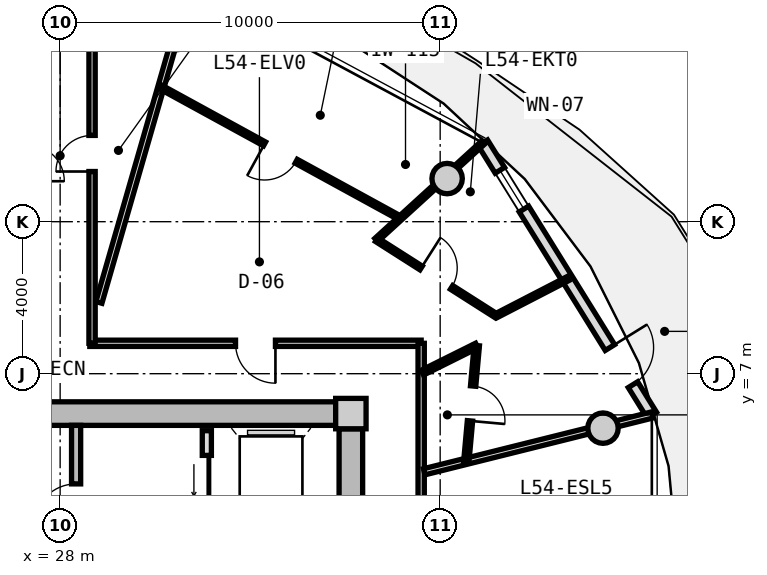
"""IFC4 building model, lengths in metres.
Left out: names, types, materials, properties, quantities, classifications, styles, units other than length and angle.
Written with IfcOpenShell. Run it as: python <this file> out.ifc"""

import sys

from ifc_helpers import new_model, si_unit, direction, frame, frame_2d, origin, origin_2d, place, context, subcontext, project, spatial, rectangle, circle, extrude, source, transform, mapped, element, fill, save


model = new_model("IFC4")
c1 = context("Model", 3, precision=1e-05, world=origin(), true_north=direction((0.0, 1.0)))
c2 = subcontext(c1, "Body", "Model", "MODEL_VIEW")
j1 = project(units=[si_unit("LENGTHUNIT", "METRE"), si_unit("PLANEANGLEUNIT", "RADIAN")], contexts=[c1])
p1 = place(None, origin())
s1 = spatial("IfcSite", under=j1, at=p1, CompositionType="ELEMENT")
p2 = place(p1, origin())
s2 = spatial("IfcBuilding", under=s1, at=p2, CompositionType="ELEMENT")
p3 = place(p2, frame((0.0, 0.0, 173.95)))
s3 = spatial("IfcBuildingStorey", under=s2, at=p3, CompositionType="ELEMENT", Elevation=173.95)
m1 = source(origin(), c2, "Body", "SweptSolid", [
    extrude(rectangle(XDim=0.8, YDim=0.8, at=origin_2d()), origin(), (0.0, 0.0, 1.0), 3.05),
])
p4 = place(p3, frame((35.65, 5.95, 0.0), z_axis=(0.0, 0.0, 1.0), x_axis=(1.0, 0.0, 0.0)))
e1 = element("IfcColumn", 1, at=p4, inside=s3, PredefinedType="COLUMN", context=c2, shape_type="MappedRepresentation", body=[
    mapped(m1, transform((0.0, 0.0, 0.0), x_axis=(1.0, 0.0, 0.0), y_axis=(0.0, 1.0, 0.0), z_axis=(0.0, 0.0, 1.0), scale=1.0)),
])
m2 = source(origin(), c2, "Body", "SweptSolid", [
    extrude(rectangle(XDim=14.5, YDim=0.62, at=frame_2d((7.25, 0.0))), origin(), (0.0, 0.0, 1.0), 2.81),
])
p5 = place(p3, frame((20.75, 5.95, 0.0), z_axis=(0.0, 0.0, 1.0), x_axis=(1.0, 0.0, 0.0)))
e2 = element("IfcWall", 2, at=p5, inside=s3, PredefinedType="SHEAR", context=c2, shape_type="MappedRepresentation", body=[
    mapped(m2, transform((0.0, 0.0, 0.0), x_axis=(1.0, 0.0, 0.0), y_axis=(0.0, 1.0, 0.0), z_axis=(0.0, 0.0, 1.0), scale=1.0)),
])
m3 = source(origin(), c2, "Body", "SweptSolid", [
    extrude(rectangle(XDim=11.1, YDim=0.62, at=frame_2d((5.55, 0.0))), origin(), (0.0, 0.0, 1.0), 2.81),
])
p6 = place(p3, frame((35.65, 5.55, 0.0), z_axis=(0.0, 0.0, 1.0), x_axis=(0.0, -1.0, 0.0)))
e3 = element("IfcWall", 3, at=p6, inside=s3, PredefinedType="SHEAR", context=c2, shape_type="MappedRepresentation", body=[
    mapped(m3, transform((0.0, 0.0, 0.0), x_axis=(1.0, 0.0, 0.0), y_axis=(0.0, 1.0, 0.0), z_axis=(0.0, 0.0, 1.0), scale=1.0)),
])
p7 = place(p6, frame((5.65, 0.0, 0.0)))
e4 = element("IfcOpeningElement", 4, at=p7, cuts=e3, PredefinedType="OPENING", context=c2, shape_type="SweptSolid", body=[
    extrude(rectangle(XDim=1.2, YDim=2.15, at=frame_2d((0.6, 1.075))), frame((0.0, 0.32, 0.0), z_axis=(0.0, -1.0, 0.0), x_axis=(1.0, 0.0, 0.0)), (0.0, 0.0, 1.0), 0.64),
])
m4 = source(origin(), c2, "Body", "SweptSolid", [
    extrude(circle(Radius=0.4, at=origin_2d()), origin(), (0.0, 0.0, 1.0), 3.05),
])
for number, where, z_axis, x_axis in (
    (5, (42.285, 5.567, 0.0), (0.0, 0.0, 1.0), (1.0, 0.0, 0.0)),
    (6, (38.183, 12.135, 0.0), (0.0, 0.0, 1.0), (1.0, 0.0, 0.0)),
):
    element("IfcColumn", number, at=place(p3, frame(where, z_axis=z_axis, x_axis=x_axis)), inside=s3, PredefinedType="COLUMN", context=c2, shape_type="MappedRepresentation", body=[
        mapped(m4, transform((0.0, 0.0, 0.0), x_axis=(1.0, 0.0, 0.0), y_axis=(0.0, 1.0, 0.0), z_axis=(0.0, 0.0, 1.0), scale=1.0)),
    ])
m5 = source(origin(), c2, "Body", "SweptSolid", [
    extrude(rectangle(XDim=8.431, YDim=0.29, at=frame_2d((4.216, 0.0))), origin(), (0.0, 0.0, 1.0), 2.81),
])
p8 = place(p3, frame((39.123, 13.075, 0.0), z_axis=(0.0, 0.0, 1.0), x_axis=(0.527377998418, -0.849630770855, 0.0)))
e7 = element("IfcWall", 7, at=p8, inside=s3, PredefinedType="SOLIDWALL", context=c2, shape_type="MappedRepresentation", body=[
    mapped(m5, transform((0.0, 0.0, 0.0), x_axis=(1.0, 0.0, 0.0), y_axis=(0.0, 1.0, 0.0), z_axis=(0.0, 0.0, 1.0), scale=1.0)),
])
p9 = place(p8, frame((6.34, 0.0, 0.0)))
e8 = element("IfcOpeningElement", 8, at=p9, cuts=e7, PredefinedType="OPENING", context=c2, shape_type="SweptSolid", body=[
    extrude(rectangle(XDim=1.15, YDim=2.25, at=frame_2d((0.575, 1.125))), frame((0.0, 0.155, 0.0), z_axis=(0.0, -1.0, 0.0), x_axis=(1.0, 0.0, 0.0)), (0.0, 0.0, 1.0), 0.31),
])
p10 = place(p8, frame((0.85, 0.0, 0.85)))
e9 = element("IfcOpeningElement", 9, at=p10, cuts=e7, PredefinedType="OPENING", context=c2, shape_type="SweptSolid", body=[
    extrude(rectangle(XDim=1.2, YDim=1.5, at=frame_2d((0.6, 0.75))), frame((0.0, 0.155, 0.0), z_axis=(0.0, -1.0, 0.0), x_axis=(1.0, 0.0, 0.0)), (0.0, 0.0, 1.0), 0.31),
])
m6 = source(origin(), c2, "Body", "SweptSolid", [
    extrude(rectangle(XDim=3.19, YDim=0.24, at=frame_2d((1.595, 0.0))), origin(), (0.0, 0.0, 1.0), 2.81),
])
p11 = place(p3, frame((28.42, 2.45, 0.0), z_axis=(0.0, 0.0, 1.0), x_axis=(0.0, 1.0, 0.0)))
e10 = element("IfcWall", 10, at=p11, inside=s3, PredefinedType="PARTITIONING", context=c2, shape_type="MappedRepresentation", body=[
    mapped(m6, transform((0.0, 0.0, 0.0), x_axis=(1.0, 0.0, 0.0), y_axis=(0.0, 1.0, 0.0), z_axis=(0.0, 0.0, 1.0), scale=1.0)),
])
p12 = place(p11, frame((0.55, 0.0, 0.0)))
e11 = element("IfcOpeningElement", 11, at=p12, cuts=e10, PredefinedType="OPENING", context=c2, shape_type="SweptSolid", body=[
    extrude(rectangle(XDim=1.1, YDim=2.15, at=frame_2d((0.55, 1.075))), frame((0.0, 0.13, 0.0), z_axis=(0.0, -1.0, 0.0), x_axis=(1.0, 0.0, 0.0)), (0.0, 0.0, 1.0), 0.26),
])
m7 = source(origin(), c2, "Body", "SweptSolid", [
    extrude(rectangle(XDim=5.0, YDim=0.24, at=frame_2d((2.5, 0.0))), origin(), (0.0, 0.0, 1.0), 2.795),
])
p13 = place(p3, frame((31.86, 0.5, 0.0), z_axis=(0.0, 0.0, 1.0), x_axis=(0.0, 1.0, 0.0)))
e12 = element("IfcWall", 12, at=p13, inside=s3, PredefinedType="PARTITIONING", context=c2, shape_type="MappedRepresentation", body=[
    mapped(m7, transform((0.0, 0.0, 0.0), x_axis=(1.0, 0.0, 0.0), y_axis=(0.0, 1.0, 0.0), z_axis=(0.0, 0.0, 1.0), scale=1.0)),
])
p14 = place(p13, frame((3.05, 0.0, 0.0)))
e13 = element("IfcOpeningElement", 13, at=p14, cuts=e12, PredefinedType="OPENING", context=c2, shape_type="SweptSolid", body=[
    extrude(rectangle(XDim=1.3, YDim=2.2, at=frame_2d((0.65, 1.1))), frame((0.0, 0.13, 0.0), z_axis=(0.0, -1.0, 0.0), x_axis=(1.0, 0.0, 0.0)), (0.0, 0.0, 1.0), 0.26),
])
p15 = place(p13, frame((0.55, 0.0, 0.0)))
e14 = element("IfcOpeningElement", 14, at=p15, cuts=e12, PredefinedType="OPENING", context=c2, shape_type="SweptSolid", body=[
    extrude(rectangle(XDim=1.3, YDim=2.2, at=frame_2d((0.65, 1.1))), frame((0.0, 0.13, 0.0), z_axis=(0.0, -1.0, 0.0), x_axis=(1.0, 0.0, 0.0)), (0.0, 0.0, 1.0), 0.26),
])
m8 = source(origin(), c2, "Body", "SweptSolid", [
    extrude(rectangle(XDim=8.719, YDim=0.165, at=frame_2d((4.36, 0.0))), origin(), (0.0, 0.0, 1.0), 2.795),
])
p16 = place(p3, frame((28.781, 7.8, 0.0), z_axis=(0.0, 0.0, 1.0), x_axis=(1.0, 0.0, 0.0)))
e15 = element("IfcWall", 15, at=p16, inside=s3, PredefinedType="PARTITIONING", context=c2, shape_type="MappedRepresentation", body=[
    mapped(m8, transform((0.0, 0.0, 0.0), x_axis=(1.0, 0.0, 0.0), y_axis=(0.0, 1.0, 0.0), z_axis=(0.0, 0.0, 1.0), scale=1.0)),
])
p17 = place(p16, frame((3.835, 0.0, 0.0)))
e16 = element("IfcOpeningElement", 16, at=p17, cuts=e15, PredefinedType="OPENING", context=c2, shape_type="SweptSolid", body=[
    extrude(rectangle(XDim=1.05, YDim=2.15, at=frame_2d((0.525, 1.075))), frame((0.0, 0.093, 0.0), z_axis=(0.0, -1.0, 0.0), x_axis=(1.0, 0.0, 0.0)), (0.0, 0.0, 1.0), 0.185),
])
m9 = source(origin(), c2, "Body", "SweptSolid", [
    extrude(rectangle(XDim=6.88, YDim=0.165, at=frame_2d((3.44, 0.0))), origin(), (0.0, 0.0, 1.0), 2.795),
])
p18 = place(p3, frame((37.5, 7.8, 0.0), z_axis=(0.0, 0.0, 1.0), x_axis=(0.0, -1.0, 0.0)))
e17 = element("IfcWall", 17, at=p18, inside=s3, PredefinedType="PARTITIONING", context=c2, shape_type="MappedRepresentation", body=[
    mapped(m9, transform((0.0, 0.0, 0.0), x_axis=(1.0, 0.0, 0.0), y_axis=(0.0, 1.0, 0.0), z_axis=(0.0, 0.0, 1.0), scale=1.0)),
])
m10 = source(origin(), c2, "Body", "SweptSolid", [
    extrude(rectangle(XDim=8.695, YDim=0.165, at=frame_2d((4.348, 0.0))), origin(), (0.0, 0.0, 1.0), 2.345),
])
p19 = place(p3, frame((29.02, 8.875, 0.0), z_axis=(0.0, 0.0, 1.0), x_axis=(0.276797231892, 0.960928349263, 0.0)))
e18 = element("IfcWall", 18, at=p19, inside=s3, PredefinedType="PARTITIONING", context=c2, shape_type="MappedRepresentation", body=[
    mapped(m10, transform((0.0, 0.0, 0.0), x_axis=(1.0, 0.0, 0.0), y_axis=(0.0, 1.0, 0.0), z_axis=(0.0, 0.0, 1.0), scale=1.0)),
])
m11 = source(origin(), c2, "Body", "SweptSolid", [
    extrude(rectangle(XDim=6.193, YDim=0.165, at=frame_2d((3.096, 0.0))), origin(), (0.0, 0.0, 1.0), 2.345),
])
p20 = place(p3, frame((37.58, 4.419, 0.0), z_axis=(0.0, 0.0, 1.0), x_axis=(0.970309243466, 0.241867674657, 0.0)))
e19 = element("IfcWall", 19, at=p20, inside=s3, PredefinedType="PARTITIONING", context=c2, shape_type="MappedRepresentation", body=[
    mapped(m11, transform((0.0, 0.0, 0.0), x_axis=(1.0, 0.0, 0.0), y_axis=(0.0, 1.0, 0.0), z_axis=(0.0, 0.0, 1.0), scale=1.0)),
])
m12 = source(origin(), c2, "Body", "SweptSolid", [
    extrude(rectangle(XDim=9.48, YDim=0.165, at=frame_2d((4.74, 0.0))), origin(), (0.0, 0.0, 1.0), 2.795),
])
p21 = place(p3, frame((28.84, 17.28, 0.0), z_axis=(0.0, 0.0, 1.0), x_axis=(0.0, -1.0, 0.0)))
e20 = element("IfcWall", 20, at=p21, inside=s3, PredefinedType="PARTITIONING", context=c2, shape_type="MappedRepresentation", body=[
    mapped(m12, transform((0.0, 0.0, 0.0), x_axis=(1.0, 0.0, 0.0), y_axis=(0.0, 1.0, 0.0), z_axis=(0.0, 0.0, 1.0), scale=1.0)),
])
p22 = place(p21, frame((4.01, 0.0, 0.0)))
e21 = element("IfcOpeningElement", 21, at=p22, cuts=e20, PredefinedType="OPENING", context=c2, shape_type="SweptSolid", body=[
    extrude(rectangle(XDim=0.95, YDim=2.1, at=frame_2d((0.475, 1.05))), frame((0.0, 0.093, 0.0), z_axis=(0.0, -1.0, 0.0), x_axis=(1.0, 0.0, 0.0)), (0.0, 0.0, 1.0), 0.185),
])
m13 = source(origin(), c2, "Body", "SweptSolid", [
    extrude(rectangle(XDim=7.167, YDim=0.115, at=frame_2d((3.583, 0.0))), origin(), (0.0, 0.0, 1.0), 2.795),
])
p23 = place(p3, frame((36.939, 11.098, 0.0), z_axis=(0.0, 0.0, 1.0), x_axis=(-0.8771628907, 0.480192943699, 0.0)))
e22 = element("IfcWall", 22, at=p23, inside=s3, PredefinedType="PARTITIONING", context=c2, shape_type="MappedRepresentation", body=[
    mapped(m13, transform((0.0, 0.0, 0.0), x_axis=(1.0, 0.0, 0.0), y_axis=(0.0, 1.0, 0.0), z_axis=(0.0, 0.0, 1.0), scale=1.0)),
])
p24 = place(p23, frame((3.108, 0.0, 0.0)))
e23 = element("IfcOpeningElement", 23, at=p24, cuts=e22, PredefinedType="OPENING", context=c2, shape_type="SweptSolid", body=[
    extrude(rectangle(XDim=0.95, YDim=2.1, at=frame_2d((0.475, 1.05))), frame((0.0, 0.067, 0.0), z_axis=(0.0, -1.0, 0.0), x_axis=(1.0, 0.0, 0.0)), (0.0, 0.0, 1.0), 0.135),
])
m14 = source(origin(), c2, "Body", "SweptSolid", [
    extrude(rectangle(XDim=3.814, YDim=0.115, at=frame_2d((1.907, 0.0))), origin(), (0.0, 0.0, 1.0), 2.345),
])
p25 = place(p3, frame((36.319, 10.518, 0.0), z_axis=(0.0, 0.0, 1.0), x_axis=(0.73871962024, 0.674012850524, 0.0)))
e24 = element("IfcWall", 24, at=p25, inside=s3, PredefinedType="PARTITIONING", context=c2, shape_type="MappedRepresentation", body=[
    mapped(m14, transform((0.0, 0.0, 0.0), x_axis=(1.0, 0.0, 0.0), y_axis=(0.0, 1.0, 0.0), z_axis=(0.0, 0.0, 1.0), scale=1.0)),
])
m15 = source(origin(), c2, "Body", "SweptSolid", [
    extrude(rectangle(XDim=1.601, YDim=0.14, at=frame_2d((0.801, 0.0))), origin(), (0.0, 0.0, 1.0), 2.795),
])
p26 = place(p3, frame((37.53, 7.026, 0.0), z_axis=(0.0, 0.0, 1.0), x_axis=(0.895279369592, 0.445505163138, 0.0)))
e25 = element("IfcWall", 25, at=p26, inside=s3, PredefinedType="PARTITIONING", context=c2, shape_type="MappedRepresentation", body=[
    mapped(m15, transform((0.0, 0.0, 0.0), x_axis=(1.0, 0.0, 0.0), y_axis=(0.0, 1.0, 0.0), z_axis=(0.0, 0.0, 1.0), scale=1.0)),
])
m16 = source(origin(), c2, "Body", "SweptSolid", [
    extrude(rectangle(XDim=3.058, YDim=0.14, at=frame_2d((1.529, 0.0))), origin(), (0.0, 0.0, 1.0), 2.795),
])
p27 = place(p3, frame((38.964, 7.74, 0.0), z_axis=(0.0, 0.0, 1.0), x_axis=(-0.090060616512, -0.99593628579, 0.0)))
e26 = element("IfcWall", 26, at=p27, inside=s3, PredefinedType="PARTITIONING", context=c2, shape_type="MappedRepresentation", body=[
    mapped(m16, transform((0.0, 0.0, 0.0), x_axis=(1.0, 0.0, 0.0), y_axis=(0.0, 1.0, 0.0), z_axis=(0.0, 0.0, 1.0), scale=1.0)),
])
p28 = place(p27, frame((1.069, 0.0, 0.0)))
e27 = element("IfcOpeningElement", 27, at=p28, cuts=e26, PredefinedType="OPENING", context=c2, shape_type="SweptSolid", body=[
    extrude(rectangle(XDim=0.92, YDim=2.1, at=frame_2d((0.46, 1.05))), frame((0.0, 0.08, 0.0), z_axis=(0.0, -1.0, 0.0), x_axis=(1.0, 0.0, 0.0)), (0.0, 0.0, 1.0), 0.16),
])
m17 = source(origin(), c2, "Body", "SweptSolid", [
    extrude(rectangle(XDim=2.13, YDim=0.115, at=frame_2d((1.065, 0.0))), origin(), (0.0, 0.0, 1.0), 2.795),
])
p29 = place(p3, frame((39.471, 8.525, 0.0), z_axis=(0.0, 0.0, 1.0), x_axis=(0.888504584778, 0.458867740016, 0.0)))
e28 = element("IfcWall", 28, at=p29, inside=s3, PredefinedType="PARTITIONING", context=c2, shape_type="MappedRepresentation", body=[
    mapped(m17, transform((0.0, 0.0, 0.0), x_axis=(1.0, 0.0, 0.0), y_axis=(0.0, 1.0, 0.0), z_axis=(0.0, 0.0, 1.0), scale=1.0)),
])
m18 = source(origin(), c2, "Body", "SweptSolid", [
    extrude(rectangle(XDim=3.725, YDim=0.115, at=frame_2d((1.863, 0.0))), origin(), (0.0, 0.0, 1.0), 2.795),
])
p30 = place(p3, frame((39.471, 8.525, 0.0), z_axis=(0.0, 0.0, 1.0), x_axis=(-0.843453635564, 0.537201977523, 0.0)))
e29 = element("IfcWall", 29, at=p30, inside=s3, PredefinedType="PARTITIONING", context=c2, shape_type="MappedRepresentation", body=[
    mapped(m18, transform((0.0, 0.0, 0.0), x_axis=(1.0, 0.0, 0.0), y_axis=(0.0, 1.0, 0.0), z_axis=(0.0, 0.0, 1.0), scale=1.0)),
])
p31 = place(p30, frame((1.388, 0.0, 0.0)))
e30 = element("IfcOpeningElement", 30, at=p31, cuts=e29, PredefinedType="OPENING", context=c2, shape_type="SweptSolid", body=[
    extrude(rectangle(XDim=0.95, YDim=2.1, at=frame_2d((0.475, 1.05))), frame((0.0, 0.067, 0.0), z_axis=(0.0, -1.0, 0.0), x_axis=(1.0, 0.0, 0.0)), (0.0, 0.0, 1.0), 0.135),
])
m19 = source(origin(), c2, "Body", "SweptSolid", [
    extrude(rectangle(XDim=1.15, YDim=2.25, at=frame_2d((0.575, 1.125))), frame((0.0, 0.025, 0.0), z_axis=(0.0, -1.0, 0.0), x_axis=(1.0, 0.0, 0.0)), (0.0, 0.0, 1.0), 0.05),
])
p32 = place(p9, origin())
e31 = element("IfcDoor", 31, at=p32, inside=s3, OperationType="SINGLE_SWING_LEFT", PredefinedType="DOOR", context=c2, shape_type="MappedRepresentation", body=[
    mapped(m19, transform((0.0, 0.0, 0.0), x_axis=(1.0, 0.0, 0.0), y_axis=(0.0, 1.0, 0.0), z_axis=(0.0, 0.0, 1.0), scale=1.0)),
])
fill(e8, e31)
m20 = source(origin(), c2, "Body", "SweptSolid", [
    extrude(rectangle(XDim=1.2, YDim=1.5, at=frame_2d((0.6, 0.75))), frame((0.0, 0.03, 0.0), z_axis=(0.0, -1.0, 0.0), x_axis=(1.0, 0.0, 0.0)), (0.0, 0.0, 1.0), 0.06),
])
p33 = place(p10, origin())
e32 = element("IfcWindow", 32, at=p33, inside=s3, PartitioningType="SINGLE_PANEL", PredefinedType="WINDOW", context=c2, shape_type="MappedRepresentation", body=[
    mapped(m20, transform((0.0, 0.0, 0.0), x_axis=(1.0, 0.0, 0.0), y_axis=(0.0, 1.0, 0.0), z_axis=(0.0, 0.0, 1.0), scale=1.0)),
])
fill(e9, e32)
m21 = source(origin(), c2, "Body", "SweptSolid", [
    extrude(rectangle(XDim=1.1, YDim=2.15, at=frame_2d((0.55, 1.075))), frame((0.0, 0.025, 0.0), z_axis=(0.0, -1.0, 0.0), x_axis=(1.0, 0.0, 0.0)), (0.0, 0.0, 1.0), 0.05),
])
p34 = place(p12, origin())
e33 = element("IfcDoor", 33, at=p34, inside=s3, OperationType="SINGLE_SWING_LEFT", PredefinedType="DOOR", context=c2, shape_type="MappedRepresentation", body=[
    mapped(m21, transform((0.0, 0.0, 0.0), x_axis=(1.0, 0.0, 0.0), y_axis=(0.0, 1.0, 0.0), z_axis=(0.0, 0.0, 1.0), scale=1.0)),
])
fill(e11, e33)
m22 = source(origin(), c2, "Body", "SweptSolid", [
    extrude(rectangle(XDim=1.3, YDim=2.2, at=frame_2d((0.65, 1.1))), frame((0.0, 0.025, 0.0), z_axis=(0.0, -1.0, 0.0), x_axis=(1.0, 0.0, 0.0)), (0.0, 0.0, 1.0), 0.05),
])
p35 = place(p14, origin())
e34 = element("IfcDoor", 34, at=p35, inside=s3, OperationType="SLIDING_TO_LEFT", PredefinedType="DOOR", context=c2, shape_type="MappedRepresentation", body=[
    mapped(m22, transform((0.0, 0.0, 0.0), x_axis=(1.0, 0.0, 0.0), y_axis=(0.0, 1.0, 0.0), z_axis=(0.0, 0.0, 1.0), scale=1.0)),
])
fill(e13, e34)
m23 = source(origin(), c2, "Body", "SweptSolid", [
    extrude(rectangle(XDim=0.95, YDim=2.1, at=frame_2d((0.475, 1.05))), frame((0.0, 0.025, 0.0), z_axis=(0.0, -1.0, 0.0), x_axis=(1.0, 0.0, 0.0)), (0.0, 0.0, 1.0), 0.05),
])
p36 = place(p22, frame((0.95, 0.0, 0.0), z_axis=(0.0, 0.0, 1.0), x_axis=(-1.0, 0.0, 0.0)))
e35 = element("IfcDoor", 35, at=p36, inside=s3, OperationType="SINGLE_SWING_LEFT", PredefinedType="DOOR", context=c2, shape_type="MappedRepresentation", body=[
    mapped(m23, transform((0.0, 0.0, 0.0), x_axis=(1.0, 0.0, 0.0), y_axis=(0.0, 1.0, 0.0), z_axis=(0.0, 0.0, 1.0), scale=1.0)),
])
fill(e21, e35)
m24 = source(origin(), c2, "Body", "SweptSolid", [
    extrude(rectangle(XDim=1.05, YDim=2.15, at=frame_2d((0.525, 1.075))), frame((0.0, 0.025, 0.0), z_axis=(0.0, -1.0, 0.0), x_axis=(1.0, 0.0, 0.0)), (0.0, 0.0, 1.0), 0.05),
])
p37 = place(p17, frame((1.05, 0.0, 0.0), z_axis=(0.0, 0.0, 1.0), x_axis=(-1.0, 0.0, 0.0)))
e36 = element("IfcDoor", 36, at=p37, inside=s3, OperationType="SINGLE_SWING_LEFT", PredefinedType="DOOR", context=c2, shape_type="MappedRepresentation", body=[
    mapped(m24, transform((0.0, 0.0, 0.0), x_axis=(1.0, 0.0, 0.0), y_axis=(0.0, 1.0, 0.0), z_axis=(0.0, 0.0, 1.0), scale=1.0)),
])
fill(e16, e36)
m25 = source(origin(), c2, "Body", "SweptSolid", [
    extrude(rectangle(XDim=0.92, YDim=2.1, at=frame_2d((0.46, 1.05))), frame((0.0, 0.025, 0.0), z_axis=(0.0, -1.0, 0.0), x_axis=(1.0, 0.0, 0.0)), (0.0, 0.0, 1.0), 0.05),
])
p38 = place(p28, origin())
e37 = element("IfcDoor", 37, at=p38, inside=s3, OperationType="SINGLE_SWING_RIGHT", PredefinedType="DOOR", context=c2, shape_type="MappedRepresentation", body=[
    mapped(m25, transform((0.0, 0.0, 0.0), x_axis=(1.0, 0.0, 0.0), y_axis=(0.0, 1.0, 0.0), z_axis=(0.0, 0.0, 1.0), scale=1.0)),
])
fill(e27, e37)
p39 = place(p31, frame((0.95, 0.0, 0.0), z_axis=(0.0, 0.0, 1.0), x_axis=(-1.0, 0.0, 0.0)))
e38 = element("IfcDoor", 38, at=p39, inside=s3, OperationType="SINGLE_SWING_LEFT", PredefinedType="DOOR", context=c2, shape_type="MappedRepresentation", body=[
    mapped(m23, transform((0.0, 0.0, 0.0), x_axis=(1.0, 0.0, 0.0), y_axis=(0.0, 1.0, 0.0), z_axis=(0.0, 0.0, 1.0), scale=1.0)),
])
fill(e30, e38)
p40 = place(p24, origin())
e39 = element("IfcDoor", 39, at=p40, inside=s3, OperationType="SINGLE_SWING_RIGHT", PredefinedType="DOOR", context=c2, shape_type="MappedRepresentation", body=[
    mapped(m23, transform((0.0, 0.0, 0.0), x_axis=(1.0, 0.0, 0.0), y_axis=(0.0, 1.0, 0.0), z_axis=(0.0, 0.0, 1.0), scale=1.0)),
])
fill(e23, e39)
save(model, sys.argv[1])
